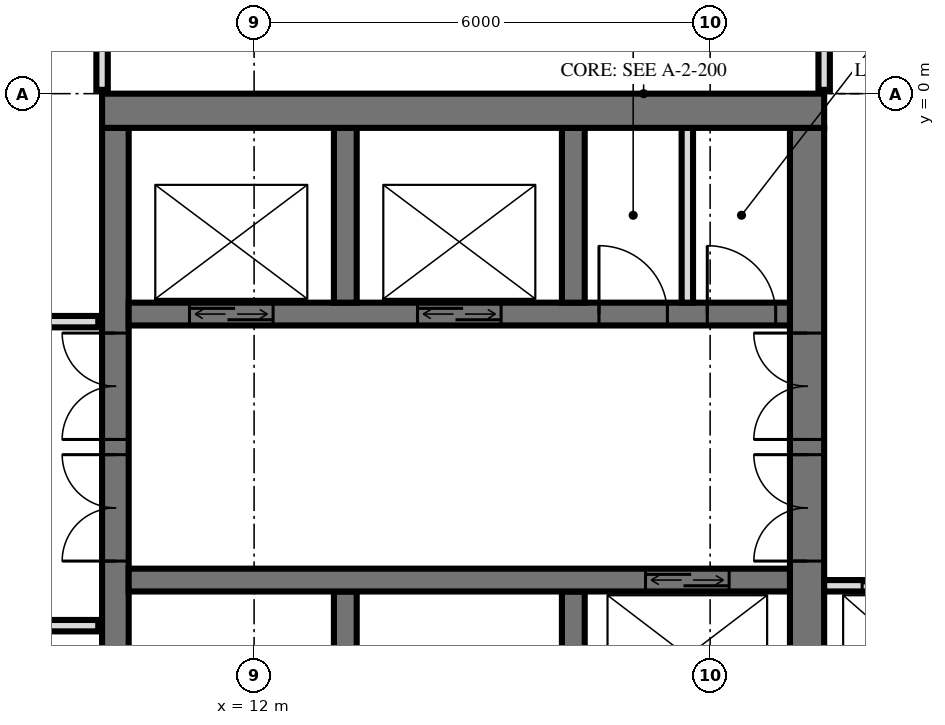
"""IFC4 building model, lengths in metres.
Left out: names, types, materials, properties, quantities, classifications, styles, units other than length and angle.
Written with IfcOpenShell. Run it as: python <this file> out.ifc"""

import sys

from ifc_helpers import new_model, si_unit, direction, frame, frame_2d, origin, place, context, subcontext, project, spatial, rectangle, extrude, element, fill, save


model = new_model("IFC4")
c1 = context("Model", 3, precision=1e-05, world=origin(), true_north=direction((0.0, 1.0)))
c2 = subcontext(c1, "Body", "Model", "MODEL_VIEW")
j1 = project(units=[si_unit("LENGTHUNIT", "METRE"), si_unit("PLANEANGLEUNIT", "RADIAN")], contexts=[c1])
p1 = place(None, origin())
s1 = spatial("IfcSite", under=j1, at=p1, CompositionType="ELEMENT")
p2 = place(p1, origin())
s2 = spatial("IfcBuilding", under=s1, at=p2, CompositionType="ELEMENT")
p3 = place(p2, frame((0.0, 0.0, 246.6)))
s3 = spatial("IfcBuildingStorey", under=s2, at=p3, CompositionType="ELEMENT", Elevation=246.6)
p4 = place(p3, frame((10.0, -0.225, 0.0), z_axis=(0.0, 0.0, 1.0), x_axis=(1.0, 0.0, 0.0)))
e1 = element("IfcWall", 1, at=p4, inside=s3, PredefinedType="SHEAR", context=c2, shape_type="SweptSolid", body=[
    extrude(rectangle(XDim=9.5, YDim=0.45, at=frame_2d((4.75, 0.0))), origin(), (0.0, 0.0, 1.0), 6.0),
])
p5 = place(p3, frame((10.175, -14.55, 0.0), z_axis=(0.0, 0.0, 1.0), x_axis=(0.0, 1.0, 0.0)))
e2 = element("IfcWall", 2, at=p5, inside=s3, PredefinedType="SHEAR", context=c2, shape_type="SweptSolid", body=[
    extrude(rectangle(XDim=14.1, YDim=0.35, at=frame_2d((7.05, 0.0))), origin(), (0.0, 0.0, 1.0), 6.0),
])
p6 = place(p5, frame((8.4, 0.0, 0.0)))
e3 = element("IfcOpeningElement", 3, at=p6, cuts=e2, PredefinedType="OPENING", context=c2, shape_type="SweptSolid", body=[
    extrude(rectangle(XDim=1.4, YDim=2.4, at=frame_2d((0.7, 1.2))), frame((0.0, 0.185, 0.0), z_axis=(0.0, -1.0, 0.0), x_axis=(1.0, 0.0, 0.0)), (0.0, 0.0, 1.0), 0.37),
])
p7 = place(p5, frame((10.0, 0.0, 0.0)))
e4 = element("IfcOpeningElement", 4, at=p7, cuts=e2, PredefinedType="OPENING", context=c2, shape_type="SweptSolid", body=[
    extrude(rectangle(XDim=1.4, YDim=2.4, at=frame_2d((0.7, 1.2))), frame((0.0, 0.185, 0.0), z_axis=(0.0, -1.0, 0.0), x_axis=(1.0, 0.0, 0.0)), (0.0, 0.0, 1.0), 0.37),
])
p8 = place(p5, frame((4.0, 0.0, 0.0)))
e5 = element("IfcOpeningElement", 5, at=p8, cuts=e2, PredefinedType="OPENING", context=c2, shape_type="SweptSolid", body=[
    extrude(rectangle(XDim=1.2, YDim=2.1, at=frame_2d((0.6, 1.05))), frame((0.0, 0.185, 0.0), z_axis=(0.0, -1.0, 0.0), x_axis=(1.0, 0.0, 0.0)), (0.0, 0.0, 1.0), 0.37),
])
p9 = place(p3, frame((19.275, -14.55, 0.0), z_axis=(0.0, 0.0, 1.0), x_axis=(0.0, 1.0, 0.0)))
e6 = element("IfcWall", 6, at=p9, inside=s3, PredefinedType="SHEAR", context=c2, shape_type="SweptSolid", body=[
    extrude(rectangle(XDim=14.1, YDim=0.45, at=frame_2d((7.05, 0.0))), origin(), (0.0, 0.0, 1.0), 6.0),
])
p10 = place(p9, frame((8.4, 0.0, 0.0)))
e7 = element("IfcOpeningElement", 7, at=p10, cuts=e6, PredefinedType="OPENING", context=c2, shape_type="SweptSolid", body=[
    extrude(rectangle(XDim=1.4, YDim=2.4, at=frame_2d((0.7, 1.2))), frame((0.0, 0.235, 0.0), z_axis=(0.0, -1.0, 0.0), x_axis=(1.0, 0.0, 0.0)), (0.0, 0.0, 1.0), 0.47),
])
p11 = place(p9, frame((10.0, 0.0, 0.0)))
e8 = element("IfcOpeningElement", 8, at=p11, cuts=e6, PredefinedType="OPENING", context=c2, shape_type="SweptSolid", body=[
    extrude(rectangle(XDim=1.4, YDim=2.4, at=frame_2d((0.7, 1.2))), frame((0.0, 0.235, 0.0), z_axis=(0.0, -1.0, 0.0), x_axis=(1.0, 0.0, 0.0)), (0.0, 0.0, 1.0), 0.47),
])
p12 = place(p3, frame((10.35, -2.9, 0.0), z_axis=(0.0, 0.0, 1.0), x_axis=(1.0, 0.0, 0.0)))
e9 = element("IfcWall", 9, at=p12, inside=s3, PredefinedType="SHEAR", context=c2, shape_type="SweptSolid", body=[
    extrude(rectangle(XDim=8.7, YDim=0.3, at=frame_2d((4.35, 0.0))), origin(), (0.0, 0.0, 1.0), 6.0),
])
p13 = place(p12, frame((0.8, 0.0, 0.0)))
e10 = element("IfcOpeningElement", 10, at=p13, cuts=e9, PredefinedType="OPENING", context=c2, shape_type="SweptSolid", body=[
    extrude(rectangle(XDim=1.1, YDim=2.1, at=frame_2d((0.55, 1.05))), frame((0.0, 0.16, 0.0), z_axis=(0.0, -1.0, 0.0), x_axis=(1.0, 0.0, 0.0)), (0.0, 0.0, 1.0), 0.32),
])
p14 = place(p12, frame((3.8, 0.0, 0.0)))
e11 = element("IfcOpeningElement", 11, at=p14, cuts=e9, PredefinedType="OPENING", context=c2, shape_type="SweptSolid", body=[
    extrude(rectangle(XDim=1.1, YDim=2.1, at=frame_2d((0.55, 1.05))), frame((0.0, 0.16, 0.0), z_axis=(0.0, -1.0, 0.0), x_axis=(1.0, 0.0, 0.0)), (0.0, 0.0, 1.0), 0.32),
])
p15 = place(p12, frame((6.188, 0.0, 0.0)))
e12 = element("IfcOpeningElement", 12, at=p15, cuts=e9, PredefinedType="OPENING", context=c2, shape_type="SweptSolid", body=[
    extrude(rectangle(XDim=0.9, YDim=2.1, at=frame_2d((0.45, 1.05))), frame((0.0, 0.16, 0.0), z_axis=(0.0, -1.0, 0.0), x_axis=(1.0, 0.0, 0.0)), (0.0, 0.0, 1.0), 0.32),
])
p16 = place(p12, frame((7.613, 0.0, 0.0)))
e13 = element("IfcOpeningElement", 13, at=p16, cuts=e9, PredefinedType="OPENING", context=c2, shape_type="SweptSolid", body=[
    extrude(rectangle(XDim=0.9, YDim=2.1, at=frame_2d((0.45, 1.05))), frame((0.0, 0.16, 0.0), z_axis=(0.0, -1.0, 0.0), x_axis=(1.0, 0.0, 0.0)), (0.0, 0.0, 1.0), 0.32),
])
p17 = place(p3, frame((10.35, -6.4, 0.0), z_axis=(0.0, 0.0, 1.0), x_axis=(1.0, 0.0, 0.0)))
e14 = element("IfcWall", 14, at=p17, inside=s3, PredefinedType="SHEAR", context=c2, shape_type="SweptSolid", body=[
    extrude(rectangle(XDim=8.7, YDim=0.3, at=frame_2d((4.35, 0.0))), origin(), (0.0, 0.0, 1.0), 6.0),
])
p18 = place(p17, frame((6.8, 0.0, 0.0)))
e15 = element("IfcOpeningElement", 15, at=p18, cuts=e14, PredefinedType="OPENING", context=c2, shape_type="SweptSolid", body=[
    extrude(rectangle(XDim=1.1, YDim=2.1, at=frame_2d((0.55, 1.05))), frame((0.0, 0.16, 0.0), z_axis=(0.0, -1.0, 0.0), x_axis=(1.0, 0.0, 0.0)), (0.0, 0.0, 1.0), 0.32),
])
for number, where, z_axis, x_axis in (
    (16, (13.2, -2.75, 0.0), (0.0, 0.0, 1.0), (0.0, 1.0, 0.0)),
    (17, (13.2, -8.85, 0.0), (0.0, 0.0, 1.0), (0.0, 1.0, 0.0)),
    (18, (16.2, -2.75, 0.0), (0.0, 0.0, 1.0), (0.0, 1.0, 0.0)),
    (19, (16.2, -8.85, 0.0), (0.0, 0.0, 1.0), (0.0, 1.0, 0.0)),
):
    element("IfcWall", number, at=place(p3, frame(where, z_axis=z_axis, x_axis=x_axis)), inside=s3, PredefinedType="SHEAR", context=c2, shape_type="SweptSolid", body=[
        extrude(rectangle(XDim=2.3, YDim=0.3, at=frame_2d((1.15, 0.0))), origin(), (0.0, 0.0, 1.0), 6.0),
    ])
p19 = place(p3, frame((19.5, -6.475, 0.0), z_axis=(0.0, 0.0, 1.0), x_axis=(1.0, 0.0, 0.0)))
e20 = element("IfcWall", 20, at=p19, inside=s3, PredefinedType="PARTITIONING", context=c2, shape_type="SweptSolid", body=[
    extrude(rectangle(XDim=2.25, YDim=0.15, at=frame_2d((1.125, 0.0))), origin(), (0.0, 0.0, 1.0), 5.2),
])
p20 = place(p19, frame((0.5, 0.0, 0.0)))
e21 = element("IfcOpeningElement", 21, at=p20, cuts=e20, PredefinedType="OPENING", context=c2, shape_type="SweptSolid", body=[
    extrude(rectangle(XDim=1.1, YDim=2.1, at=frame_2d((0.55, 1.05))), frame((0.0, 0.085, 0.0), z_axis=(0.0, -1.0, 0.0), x_axis=(1.0, 0.0, 0.0)), (0.0, 0.0, 1.0), 0.17),
])
p21 = place(p3, frame((17.7, -2.75, 0.0), z_axis=(0.0, 0.0, 1.0), x_axis=(0.0, 1.0, 0.0)))
e22 = element("IfcWall", 22, at=p21, inside=s3, PredefinedType="PARTITIONING", context=c2, shape_type="SweptSolid", body=[
    extrude(rectangle(XDim=2.3, YDim=0.15, at=frame_2d((1.15, 0.0))), origin(), (0.0, 0.0, 1.0), 5.7),
])
p22 = place(p3, frame((19.5, 0.05, 0.0), z_axis=(0.0, 0.0, 1.0), x_axis=(0.0, 1.0, 0.0)))
e23 = element("IfcWall", 23, at=p22, inside=s3, PredefinedType="PARTITIONING", context=c2, shape_type="SweptSolid", body=[
    extrude(rectangle(XDim=0.787, YDim=0.15, at=frame_2d((0.394, 0.0))), origin(), (0.0, 0.0, 1.0), 5.7),
])
p23 = place(p3, frame((10.0, 0.05, 0.0), z_axis=(0.0, 0.0, 1.0), x_axis=(0.0, 1.0, 0.0)))
e24 = element("IfcWall", 24, at=p23, inside=s3, PredefinedType="PARTITIONING", context=c2, shape_type="SweptSolid", body=[
    extrude(rectangle(XDim=0.91, YDim=0.15, at=frame_2d((0.455, 0.0))), origin(), (0.0, 0.0, 1.0), 5.7),
])
p24 = place(p3, frame((-9.95, -7.0, 0.0), z_axis=(0.0, 0.0, 1.0), x_axis=(1.0, 0.0, 0.0)))
e25 = element("IfcWall", 25, at=p24, inside=s3, PredefinedType="PARTITIONING", context=c2, shape_type="SweptSolid", body=[
    extrude(rectangle(XDim=19.9, YDim=0.15, at=frame_2d((9.95, 0.0))), origin(), (0.0, 0.0, 1.0), 5.7),
])
p25 = place(p24, frame((9.45, 0.0, 0.0)))
e26 = element("IfcOpeningElement", 26, at=p25, cuts=e25, PredefinedType="OPENING", context=c2, shape_type="SweptSolid", body=[
    extrude(rectangle(XDim=1.0, YDim=2.1, at=frame_2d((0.5, 1.05))), frame((0.0, 0.085, 0.0), z_axis=(0.0, -1.0, 0.0), x_axis=(1.0, 0.0, 0.0)), (0.0, 0.0, 1.0), 0.17),
])
p26 = place(p24, frame((2.0, 0.0, 0.0)))
e27 = element("IfcOpeningElement", 27, at=p26, cuts=e25, PredefinedType="OPENING", context=c2, shape_type="SweptSolid", body=[
    extrude(rectangle(XDim=1.0, YDim=2.1, at=frame_2d((0.5, 1.05))), frame((0.0, 0.085, 0.0), z_axis=(0.0, -1.0, 0.0), x_axis=(1.0, 0.0, 0.0)), (0.0, 0.0, 1.0), 0.17),
])
p27 = place(p3, frame((-9.95, -3.0, 0.0), z_axis=(0.0, 0.0, 1.0), x_axis=(1.0, 0.0, 0.0)))
e28 = element("IfcWall", 28, at=p27, inside=s3, PredefinedType="PARTITIONING", context=c2, shape_type="SweptSolid", body=[
    extrude(rectangle(XDim=19.9, YDim=0.15, at=frame_2d((9.95, 0.0))), origin(), (0.0, 0.0, 1.0), 5.7),
])
p28 = place(p27, frame((2.0, 0.0, 0.0)))
e29 = element("IfcOpeningElement", 29, at=p28, cuts=e28, PredefinedType="OPENING", context=c2, shape_type="SweptSolid", body=[
    extrude(rectangle(XDim=1.0, YDim=2.1, at=frame_2d((0.5, 1.05))), frame((0.0, 0.085, 0.0), z_axis=(0.0, -1.0, 0.0), x_axis=(1.0, 0.0, 0.0)), (0.0, 0.0, 1.0), 0.17),
])
p29 = place(p27, frame((8.95, 0.0, 0.0)))
e30 = element("IfcOpeningElement", 30, at=p29, cuts=e28, PredefinedType="OPENING", context=c2, shape_type="SweptSolid", body=[
    extrude(rectangle(XDim=1.0, YDim=2.1, at=frame_2d((0.5, 1.05))), frame((0.0, 0.085, 0.0), z_axis=(0.0, -1.0, 0.0), x_axis=(1.0, 0.0, 0.0)), (0.0, 0.0, 1.0), 0.17),
])
p30 = place(p27, frame((11.7, 0.0, 0.0)))
e31 = element("IfcOpeningElement", 31, at=p30, cuts=e28, PredefinedType="OPENING", context=c2, shape_type="SweptSolid", body=[
    extrude(rectangle(XDim=1.0, YDim=2.1, at=frame_2d((0.5, 1.05))), frame((0.0, 0.085, 0.0), z_axis=(0.0, -1.0, 0.0), x_axis=(1.0, 0.0, 0.0)), (0.0, 0.0, 1.0), 0.17),
])
p31 = place(p27, frame((16.9, 0.0, 0.0)))
e32 = element("IfcOpeningElement", 32, at=p31, cuts=e28, PredefinedType="OPENING", context=c2, shape_type="SweptSolid", body=[
    extrude(rectangle(XDim=1.0, YDim=2.1, at=frame_2d((0.5, 1.05))), frame((0.0, 0.085, 0.0), z_axis=(0.0, -1.0, 0.0), x_axis=(1.0, 0.0, 0.0)), (0.0, 0.0, 1.0), 0.17),
])
p32 = place(p20, origin())
e33 = element("IfcDoor", 33, at=p32, inside=s3, OperationType="DOUBLE_DOOR_SLIDING", PredefinedType="USERDEFINED", context=c2, shape_type="SweptSolid", body=[
    extrude(rectangle(XDim=1.1, YDim=2.1, at=frame_2d((0.55, 1.05))), frame((0.0, 0.025, 0.0), z_axis=(0.0, -1.0, 0.0), x_axis=(1.0, 0.0, 0.0)), (0.0, 0.0, 1.0), 0.05),
])
fill(e21, e33)
p33 = place(p13, origin())
e34 = element("IfcDoor", 34, at=p33, inside=s3, OperationType="DOUBLE_DOOR_SLIDING", PredefinedType="USERDEFINED", context=c2, shape_type="SweptSolid", body=[
    extrude(rectangle(XDim=1.1, YDim=2.1, at=frame_2d((0.55, 1.05))), frame((0.0, 0.025, 0.0), z_axis=(0.0, -1.0, 0.0), x_axis=(1.0, 0.0, 0.0)), (0.0, 0.0, 1.0), 0.05),
])
fill(e10, e34)
p34 = place(p14, origin())
e35 = element("IfcDoor", 35, at=p34, inside=s3, OperationType="DOUBLE_DOOR_SLIDING", PredefinedType="USERDEFINED", context=c2, shape_type="SweptSolid", body=[
    extrude(rectangle(XDim=1.1, YDim=2.1, at=frame_2d((0.55, 1.05))), frame((0.0, 0.025, 0.0), z_axis=(0.0, -1.0, 0.0), x_axis=(1.0, 0.0, 0.0)), (0.0, 0.0, 1.0), 0.05),
])
fill(e11, e35)
p35 = place(p18, origin())
e36 = element("IfcDoor", 36, at=p35, inside=s3, OperationType="DOUBLE_DOOR_SLIDING", PredefinedType="USERDEFINED", context=c2, shape_type="SweptSolid", body=[
    extrude(rectangle(XDim=1.1, YDim=2.1, at=frame_2d((0.55, 1.05))), frame((0.0, 0.025, 0.0), z_axis=(0.0, -1.0, 0.0), x_axis=(1.0, 0.0, 0.0)), (0.0, 0.0, 1.0), 0.05),
])
fill(e15, e36)
p36 = place(p10, origin())
e37 = element("IfcDoor", 37, at=p36, inside=s3, OperationType="DOUBLE_DOOR_SINGLE_SWING", PredefinedType="DOOR", context=c2, shape_type="SweptSolid", body=[
    extrude(rectangle(XDim=1.4, YDim=2.4, at=frame_2d((0.7, 1.2))), frame((0.0, 0.025, 0.0), z_axis=(0.0, -1.0, 0.0), x_axis=(1.0, 0.0, 0.0)), (0.0, 0.0, 1.0), 0.05),
])
fill(e7, e37)
p37 = place(p11, origin())
e38 = element("IfcDoor", 38, at=p37, inside=s3, OperationType="DOUBLE_DOOR_SINGLE_SWING", PredefinedType="DOOR", context=c2, shape_type="SweptSolid", body=[
    extrude(rectangle(XDim=1.4, YDim=2.4, at=frame_2d((0.7, 1.2))), frame((0.0, 0.025, 0.0), z_axis=(0.0, -1.0, 0.0), x_axis=(1.0, 0.0, 0.0)), (0.0, 0.0, 1.0), 0.05),
])
fill(e8, e38)
p38 = place(p6, origin())
e39 = element("IfcDoor", 39, at=p38, inside=s3, OperationType="DOUBLE_DOOR_SINGLE_SWING", PredefinedType="DOOR", context=c2, shape_type="SweptSolid", body=[
    extrude(rectangle(XDim=1.4, YDim=2.4, at=frame_2d((0.7, 1.2))), frame((0.0, 0.025, 0.0), z_axis=(0.0, -1.0, 0.0), x_axis=(1.0, 0.0, 0.0)), (0.0, 0.0, 1.0), 0.05),
])
fill(e3, e39)
p39 = place(p7, origin())
e40 = element("IfcDoor", 40, at=p39, inside=s3, OperationType="DOUBLE_DOOR_SINGLE_SWING", PredefinedType="DOOR", context=c2, shape_type="SweptSolid", body=[
    extrude(rectangle(XDim=1.4, YDim=2.4, at=frame_2d((0.7, 1.2))), frame((0.0, 0.025, 0.0), z_axis=(0.0, -1.0, 0.0), x_axis=(1.0, 0.0, 0.0)), (0.0, 0.0, 1.0), 0.05),
])
fill(e4, e40)
p40 = place(p15, origin())
e41 = element("IfcDoor", 41, at=p40, inside=s3, OperationType="SINGLE_SWING_RIGHT", PredefinedType="DOOR", context=c2, shape_type="SweptSolid", body=[
    extrude(rectangle(XDim=0.9, YDim=2.1, at=frame_2d((0.45, 1.05))), frame((0.0, 0.025, 0.0), z_axis=(0.0, -1.0, 0.0), x_axis=(1.0, 0.0, 0.0)), (0.0, 0.0, 1.0), 0.05),
])
fill(e12, e41)
p41 = place(p16, origin())
e42 = element("IfcDoor", 42, at=p41, inside=s3, OperationType="SINGLE_SWING_RIGHT", PredefinedType="DOOR", context=c2, shape_type="SweptSolid", body=[
    extrude(rectangle(XDim=0.9, YDim=2.1, at=frame_2d((0.45, 1.05))), frame((0.0, 0.025, 0.0), z_axis=(0.0, -1.0, 0.0), x_axis=(1.0, 0.0, 0.0)), (0.0, 0.0, 1.0), 0.05),
])
fill(e13, e42)
save(model, sys.argv[1])
